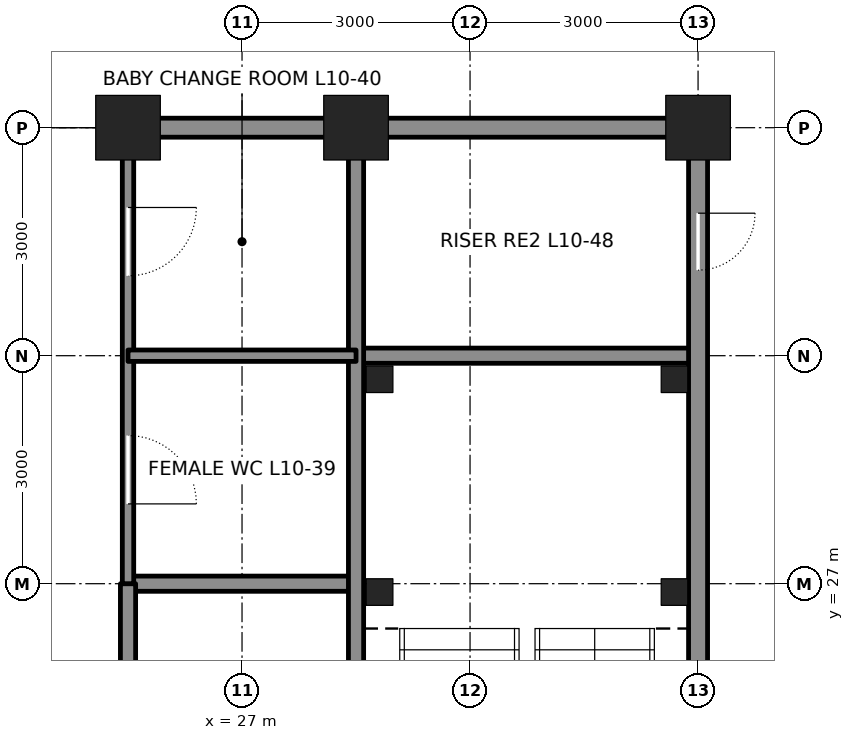
"""IFC4 building model, lengths in metres.
Left out: names, types, materials, properties, quantities, classifications, styles, units other than length and angle.
Written with IfcOpenShell. Run it as: python <this file> out.ifc"""

import sys

from ifc_helpers import new_model, si_unit, direction, frame, frame_2d, origin, origin_2d, place, context, subcontext, project, spatial, rectangle, hollow_rectangle, extrude, element, fill, save


model = new_model("IFC4")
c1 = context("Model", 3, precision=1e-05, world=origin(), true_north=direction((0.0, 1.0)))
c2 = subcontext(c1, "Body", "Model", "MODEL_VIEW")
j1 = project(units=[si_unit("LENGTHUNIT", "METRE"), si_unit("PLANEANGLEUNIT", "RADIAN")], contexts=[c1])
p1 = place(None, origin())
s1 = spatial("IfcSite", under=j1, at=p1, CompositionType="ELEMENT")
p2 = place(p1, origin())
s2 = spatial("IfcBuilding", under=s1, at=p2, CompositionType="ELEMENT")
p3 = place(p2, frame((0.0, 0.0, 51.3)))
s3 = spatial("IfcBuildingStorey", under=s2, at=p3, CompositionType="ELEMENT", Elevation=51.3)
for number, where, z_axis, x_axis in (
    (1, (25.5, 33.0, 0.0), (0.0, 0.0, 1.0), (1.0, 0.0, 0.0)),
    (2, (28.5, 33.0, 0.0), (0.0, 0.0, 1.0), (1.0, 0.0, 0.0)),
    (3, (33.0, 33.0, 0.0), (0.0, 0.0, 1.0), (1.0, 0.0, 0.0)),
):
    element("IfcColumn", number, at=place(p3, frame(where, z_axis=z_axis, x_axis=x_axis)), inside=s3, PredefinedType="COLUMN", context=c2, shape_type="SweptSolid", body=[
        extrude(hollow_rectangle(XDim=0.85, YDim=0.85, WallThickness=0.085, at=origin_2d()), origin(), (0.0, 0.0, 1.0), 4.5),
    ])
p4 = place(p3, frame((25.5, 27.0, 0.0), z_axis=(0.0, 0.0, 1.0), x_axis=(1.0, 0.0, 0.0)))
e4 = element("IfcWall", 4, at=p4, inside=s3, PredefinedType="SOLIDWALL", context=c2, shape_type="SweptSolid", body=[
    extrude(rectangle(XDim=3.0, YDim=0.2, at=frame_2d((1.5, 0.0))), origin(), (0.0, 0.0, 1.0), 4.34),
])
p5 = place(p3, frame((28.5, 30.0, 0.0), z_axis=(0.0, 0.0, 1.0), x_axis=(1.0, 0.0, 0.0)))
e5 = element("IfcWall", 5, at=p5, inside=s3, PredefinedType="SOLIDWALL", context=c2, shape_type="SweptSolid", body=[
    extrude(rectangle(XDim=4.5, YDim=0.2, at=frame_2d((2.25, 0.0))), origin(), (0.0, 0.0, 1.0), 4.34),
])
p6 = place(p3, frame((25.75, 33.0, 0.0), z_axis=(0.0, 0.0, 1.0), x_axis=(1.0, 0.0, 0.0)))
e6 = element("IfcWall", 6, at=p6, inside=s3, PredefinedType="SOLIDWALL", context=c2, shape_type="SweptSolid", body=[
    extrude(rectangle(XDim=2.5, YDim=0.25, at=frame_2d((1.25, 0.0))), origin(), (0.0, 0.0, 1.0), 3.181),
])
p7 = place(p3, frame((28.75, 33.0, 0.0), z_axis=(0.0, 0.0, 1.0), x_axis=(1.0, 0.0, 0.0)))
e7 = element("IfcWall", 7, at=p7, inside=s3, PredefinedType="SOLIDWALL", context=c2, shape_type="SweptSolid", body=[
    extrude(rectangle(XDim=4.0, YDim=0.25, at=frame_2d((2.0, 0.0))), origin(), (0.0, 0.0, 1.0), 3.181),
])
p8 = place(p3, frame((25.5, 15.0, 0.0), z_axis=(0.0, 0.0, 1.0), x_axis=(0.0, 1.0, 0.0)))
e8 = element("IfcWall", 8, at=p8, inside=s3, PredefinedType="SOLIDWALL", context=c2, shape_type="SweptSolid", body=[
    extrude(rectangle(XDim=12.0, YDim=0.2, at=frame_2d((6.0, 0.0))), origin(), (0.0, 0.0, 1.0), 3.365),
])
p9 = place(p3, frame((25.5, 27.0, 0.0), z_axis=(0.0, 0.0, 1.0), x_axis=(0.0, 1.0, 0.0)))
e9 = element("IfcWall", 9, at=p9, inside=s3, PredefinedType="PARTITIONING", context=c2, shape_type="SweptSolid", body=[
    extrude(rectangle(XDim=5.75, YDim=0.15, at=frame_2d((2.875, 0.0))), origin(), (0.0, 0.0, 1.0), 3.365),
])
p10 = place(p9, frame((1.05, 0.0, 0.0)))
e10 = element("IfcOpeningElement", 10, at=p10, cuts=e9, PredefinedType="OPENING", context=c2, shape_type="SweptSolid", body=[
    extrude(rectangle(XDim=0.9, YDim=2.1, at=frame_2d((0.45, 1.05))), frame((0.0, 0.085, 0.0), z_axis=(0.0, -1.0, 0.0), x_axis=(1.0, 0.0, 0.0)), (0.0, 0.0, 1.0), 0.17),
])
p11 = place(p9, frame((4.05, 0.0, 0.0)))
e11 = element("IfcOpeningElement", 11, at=p11, cuts=e9, PredefinedType="OPENING", context=c2, shape_type="SweptSolid", body=[
    extrude(rectangle(XDim=0.9, YDim=2.1, at=frame_2d((0.45, 1.05))), frame((0.0, 0.085, 0.0), z_axis=(0.0, -1.0, 0.0), x_axis=(1.0, 0.0, 0.0)), (0.0, 0.0, 1.0), 0.17),
])
p12 = place(p3, frame((28.5, 24.25, 0.0), z_axis=(0.0, 0.0, 1.0), x_axis=(0.0, 1.0, 0.0)))
e12 = element("IfcWall", 12, at=p12, inside=s3, PredefinedType="SOLIDWALL", context=c2, shape_type="SweptSolid", body=[
    extrude(rectangle(XDim=8.5, YDim=0.2, at=frame_2d((4.25, 0.0))), origin(), (0.0, 0.0, 1.0), 3.413),
])
p13 = place(p3, frame((33.0, 24.25, 0.0), z_axis=(0.0, 0.0, 1.0), x_axis=(0.0, 1.0, 0.0)))
e13 = element("IfcWall", 13, at=p13, inside=s3, PredefinedType="SOLIDWALL", context=c2, shape_type="SweptSolid", body=[
    extrude(rectangle(XDim=8.5, YDim=0.25, at=frame_2d((4.25, 0.0))), origin(), (0.0, 0.0, 1.0), 3.113),
])
p14 = place(p13, frame((6.875, 0.0, 0.0)))
e14 = element("IfcOpeningElement", 14, at=p14, cuts=e13, PredefinedType="OPENING", context=c2, shape_type="SweptSolid", body=[
    extrude(rectangle(XDim=0.75, YDim=2.1, at=frame_2d((0.375, 1.05))), frame((0.0, 0.135, 0.0), z_axis=(0.0, -1.0, 0.0), x_axis=(1.0, 0.0, 0.0)), (0.0, 0.0, 1.0), 0.27),
])
p15 = place(p3, frame((25.5, 30.0, 0.0), z_axis=(0.0, 0.0, 1.0), x_axis=(1.0, 0.0, 0.0)))
e15 = element("IfcWall", 15, at=p15, inside=s3, PredefinedType="PARTITIONING", context=c2, shape_type="SweptSolid", body=[
    extrude(rectangle(XDim=3.0, YDim=0.15, at=frame_2d((1.5, 0.0))), origin(), (0.0, 0.0, 1.0), 4.34),
])
for number, where, z_axis, x_axis in (
    (16, (28.81, 29.69, 0.0), (0.0, 0.0, 1.0), (1.0, 0.0, 0.0)),
    (17, (32.69, 29.69, 0.0), (0.0, 0.0, 1.0), (1.0, 0.0, 0.0)),
    (18, (28.81, 26.89, 0.0), (0.0, 0.0, 1.0), (1.0, 0.0, 0.0)),
    (19, (32.69, 26.89, 0.0), (0.0, 0.0, 1.0), (1.0, 0.0, 0.0)),
):
    element("IfcColumn", number, at=place(p3, frame(where, z_axis=z_axis, x_axis=x_axis)), inside=s3, PredefinedType="COLUMN", context=c2, shape_type="SweptSolid", body=[
        extrude(hollow_rectangle(XDim=0.35, YDim=0.35, WallThickness=0.035, at=origin_2d()), origin(), (0.0, 0.0, 1.0), 4.5),
    ])
p16 = place(p14, frame((0.75, 0.0, 0.0), z_axis=(0.0, 0.0, 1.0), x_axis=(-1.0, 0.0, 0.0)))
e20 = element("IfcDoor", 20, at=p16, inside=s3, OperationType="SINGLE_SWING_LEFT", PredefinedType="DOOR", context=c2, shape_type="SweptSolid", body=[
    extrude(rectangle(XDim=0.75, YDim=2.1, at=frame_2d((0.375, 1.05))), frame((0.0, 0.025, 0.0), z_axis=(0.0, -1.0, 0.0), x_axis=(1.0, 0.0, 0.0)), (0.0, 0.0, 1.0), 0.05),
])
fill(e14, e20)
p17 = place(p10, frame((0.9, 0.0, 0.0), z_axis=(0.0, 0.0, 1.0), x_axis=(-1.0, 0.0, 0.0)))
e21 = element("IfcDoor", 21, at=p17, inside=s3, OperationType="SINGLE_SWING_RIGHT", PredefinedType="DOOR", context=c2, shape_type="SweptSolid", body=[
    extrude(rectangle(XDim=0.9, YDim=2.1, at=frame_2d((0.45, 1.05))), frame((0.0, 0.025, 0.0), z_axis=(0.0, -1.0, 0.0), x_axis=(1.0, 0.0, 0.0)), (0.0, 0.0, 1.0), 0.05),
])
fill(e10, e21)
p18 = place(p11, frame((0.9, 0.0, 0.0), z_axis=(0.0, 0.0, 1.0), x_axis=(-1.0, 0.0, 0.0)))
e22 = element("IfcDoor", 22, at=p18, inside=s3, OperationType="SINGLE_SWING_LEFT", PredefinedType="DOOR", context=c2, shape_type="SweptSolid", body=[
    extrude(rectangle(XDim=0.9, YDim=2.1, at=frame_2d((0.45, 1.05))), frame((0.0, 0.025, 0.0), z_axis=(0.0, -1.0, 0.0), x_axis=(1.0, 0.0, 0.0)), (0.0, 0.0, 1.0), 0.05),
])
fill(e11, e22)
save(model, sys.argv[1])
